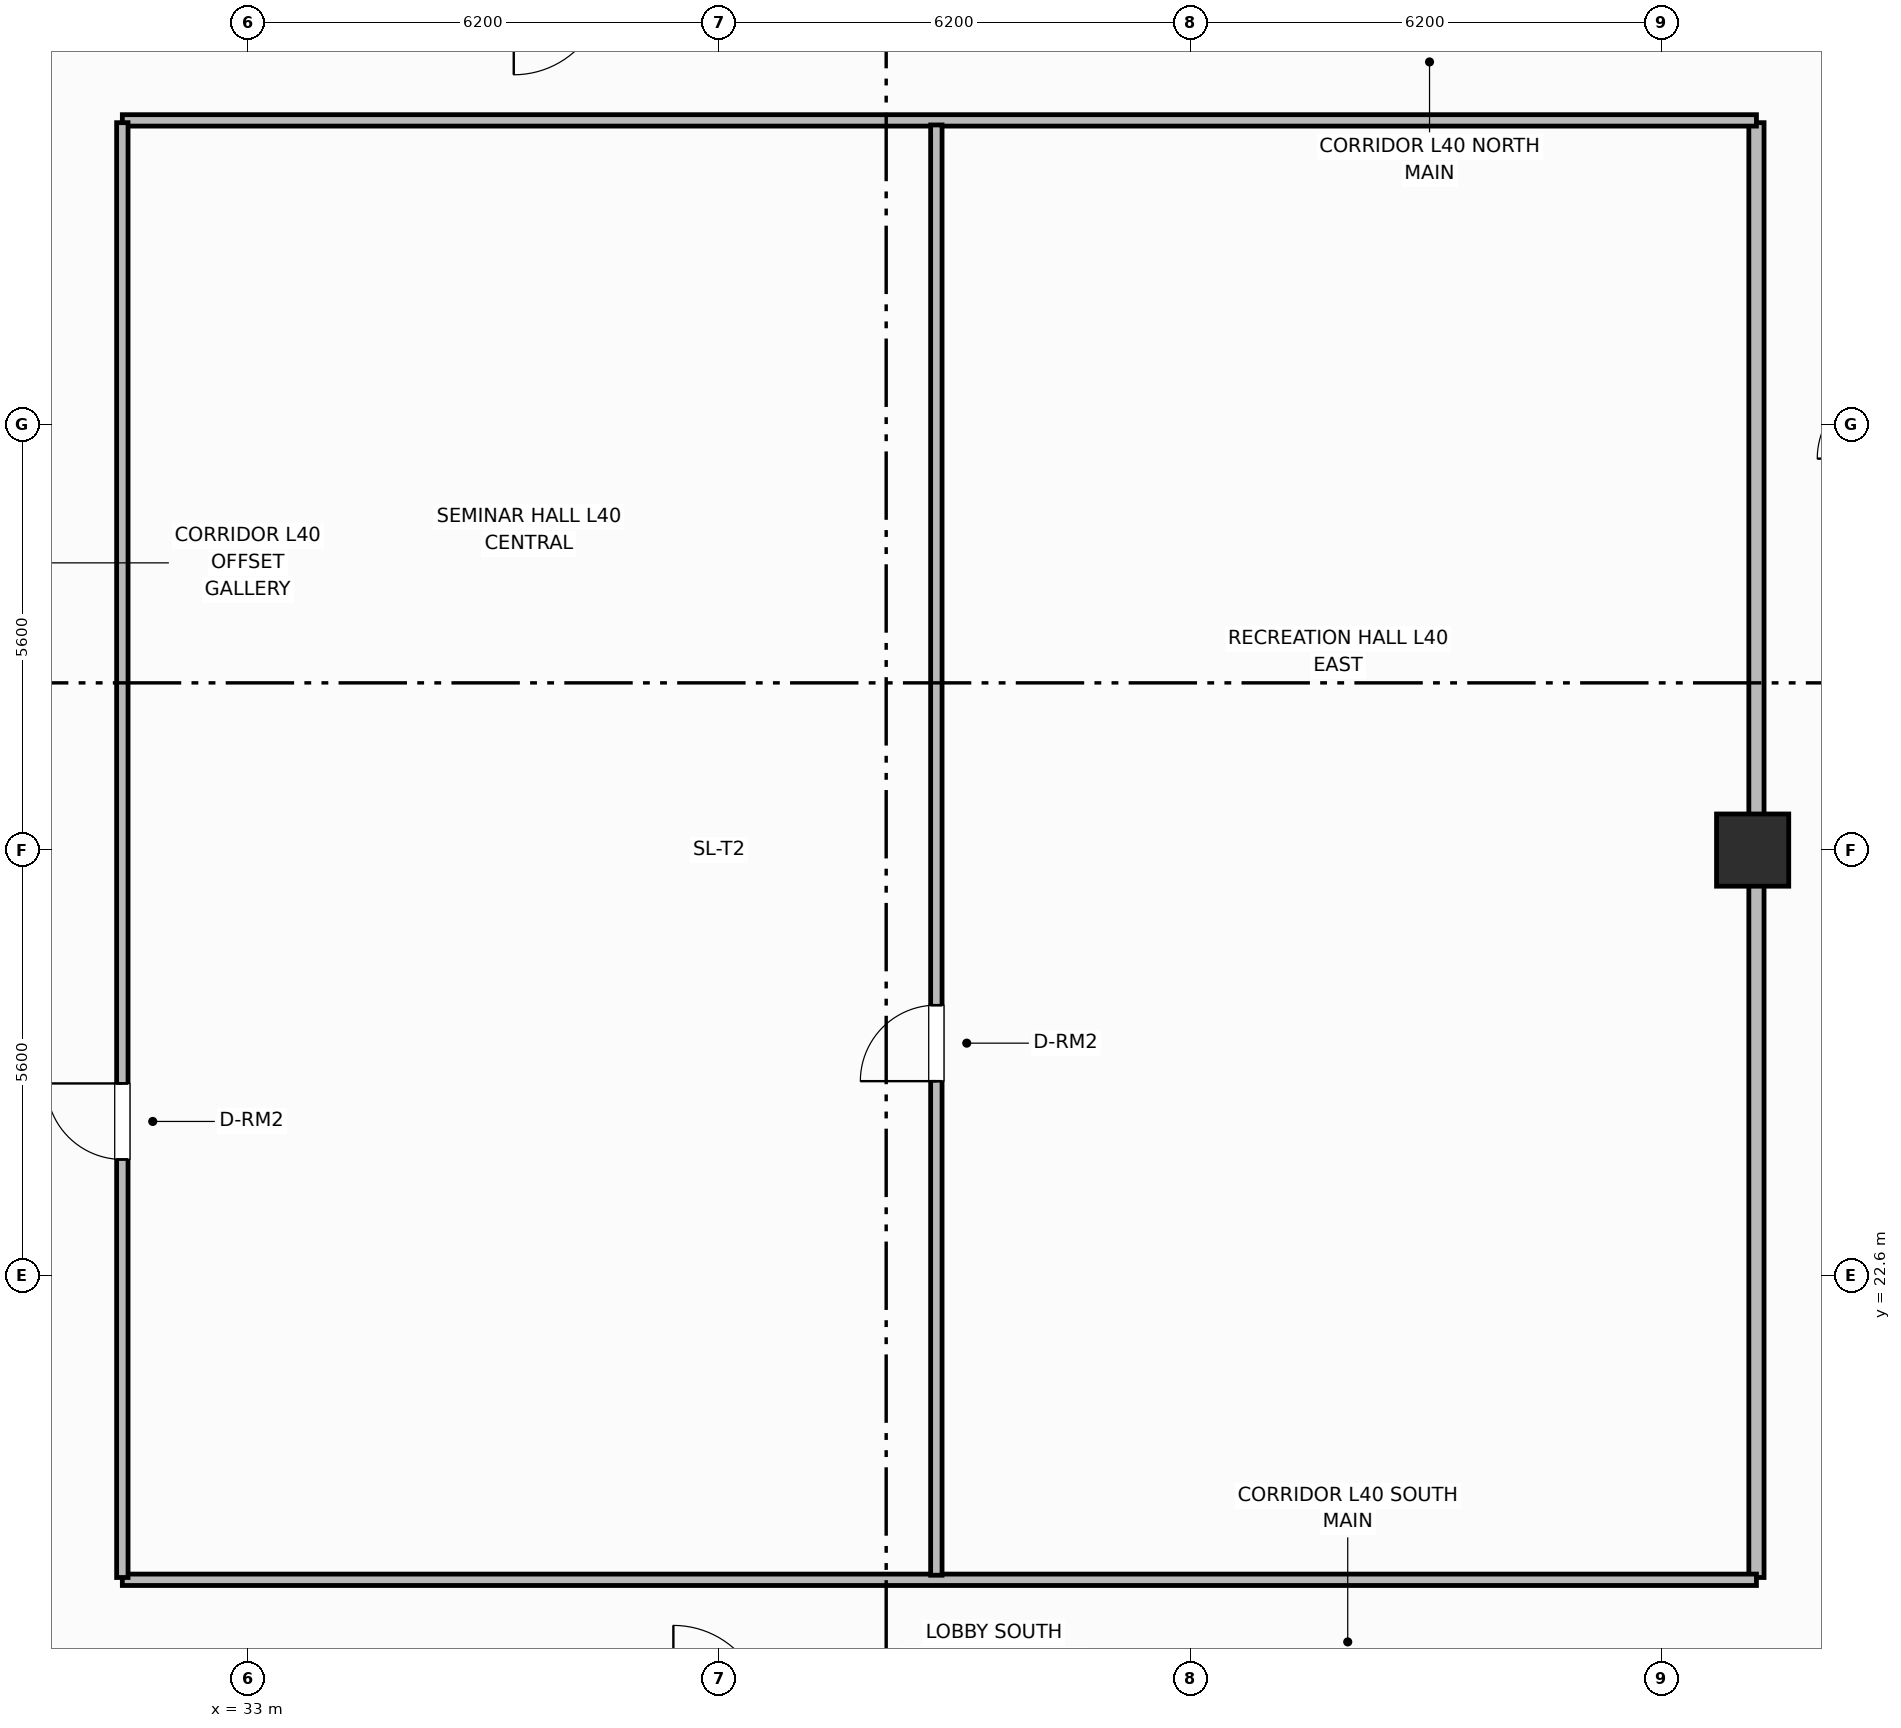
"""IFC4 building model, lengths in metres.
Left out: names, types, materials, properties, quantities, classifications, styles, units other than length and angle.
Written with IfcOpenShell. Run it as: python <this file> out.ifc"""

import sys

from ifc_helpers import new_model, si_unit, direction, frame, frame_2d, origin, origin_2d, place, context, subcontext, project, spatial, rectangle, extrude, element, fill, save


model = new_model("IFC4")
c1 = context("Model", 3, precision=1e-05, world=origin(), true_north=direction((0.0, 1.0)))
c2 = subcontext(c1, "Body", "Model", "MODEL_VIEW")
j1 = project(units=[si_unit("LENGTHUNIT", "METRE"), si_unit("PLANEANGLEUNIT", "RADIAN")], contexts=[c1])
p1 = place(None, origin())
s1 = spatial("IfcSite", under=j1, at=p1, CompositionType="ELEMENT")
p2 = place(p1, origin())
s2 = spatial("IfcBuilding", under=s1, at=p2, CompositionType="ELEMENT")
p3 = place(p2, frame((0.0, 0.0, 162.6)))
s3 = spatial("IfcBuildingStorey", under=s2, at=p3, CompositionType="ELEMENT", Elevation=162.6)
p4 = place(p3, frame((52.8, 28.2, 0.0), z_axis=(0.0, 0.0, 1.0), x_axis=(1.0, 0.0, 0.0)))
e1 = element("IfcColumn", 1, at=p4, inside=s3, PredefinedType="COLUMN", context=c2, shape_type="SweptSolid", body=[
    extrude(rectangle(XDim=0.95, YDim=0.95, at=origin_2d()), origin(), (0.0, 0.0, 1.0), 3.7),
])
p5 = place(p3, frame((52.85, 18.63, 0.0), z_axis=(0.0, 0.0, 1.0), x_axis=(0.0, 1.0, 0.0)))
e2 = element("IfcWall", 2, at=p5, inside=s3, PredefinedType="PARTITIONING", context=c2, shape_type="SweptSolid", body=[
    extrude(rectangle(XDim=19.14, YDim=0.2, at=frame_2d((9.57, 0.0))), origin(), (0.0, 0.0, 1.0), 2.55),
])
for number, where, z_axis, x_axis in (
    (3, (31.35, 18.6, 0.0), (0.0, 0.0, 1.0), (1.0, 0.0, 0.0)),
    (4, (31.35, 37.8, 0.0), (0.0, 0.0, 1.0), (1.0, 0.0, 0.0)),
):
    element("IfcWall", number, at=place(p3, frame(where, z_axis=z_axis, x_axis=x_axis)), inside=s3, PredefinedType="PARTITIONING", context=c2, shape_type="SweptSolid", body=[
        extrude(rectangle(XDim=21.5, YDim=0.15, at=frame_2d((10.75, 0.0))), origin(), (0.0, 0.0, 1.0), 2.55),
    ])
p6 = place(p3, frame((42.06, 18.66, 0.0), z_axis=(0.0, 0.0, 1.0), x_axis=(0.0, 1.0, 0.0)))
e5 = element("IfcWall", 5, at=p6, inside=s3, PredefinedType="PARTITIONING", context=c2, shape_type="SweptSolid", body=[
    extrude(rectangle(XDim=19.08, YDim=0.15, at=frame_2d((9.54, 0.0))), origin(), (0.0, 0.0, 1.0), 2.55),
])
p7 = place(p6, frame((6.5, 0.0, 0.0)))
e6 = element("IfcOpeningElement", 6, at=p7, cuts=e5, PredefinedType="OPENING", context=c2, shape_type="SweptSolid", body=[
    extrude(rectangle(XDim=1.0, YDim=2.15, at=frame_2d((0.5, 1.075))), frame((0.0, 0.085, 0.0), z_axis=(0.0, -1.0, 0.0), x_axis=(1.0, 0.0, 0.0)), (0.0, 0.0, 1.0), 0.17),
])
p8 = place(p3, frame((31.35, 18.63, 0.0), z_axis=(0.0, 0.0, 1.0), x_axis=(0.0, 1.0, 0.0)))
e7 = element("IfcWall", 7, at=p8, inside=s3, PredefinedType="PARTITIONING", context=c2, shape_type="SweptSolid", body=[
    extrude(rectangle(XDim=19.14, YDim=0.15, at=frame_2d((9.57, 0.0))), origin(), (0.0, 0.0, 1.0), 2.55),
])
p9 = place(p8, frame((5.5, 0.0, 0.0)))
e8 = element("IfcOpeningElement", 8, at=p9, cuts=e7, PredefinedType="OPENING", context=c2, shape_type="SweptSolid", body=[
    extrude(rectangle(XDim=1.0, YDim=2.15, at=frame_2d((0.5, 1.075))), frame((0.0, 0.085, 0.0), z_axis=(0.0, -1.0, 0.0), x_axis=(1.0, 0.0, 0.0)), (0.0, 0.0, 1.0), 0.17),
])
p10 = place(p7, origin())
e9 = element("IfcDoor", 9, at=p10, inside=s3, OperationType="SINGLE_SWING_LEFT", PredefinedType="DOOR", context=c2, shape_type="SweptSolid", body=[
    extrude(rectangle(XDim=1.0, YDim=2.15, at=frame_2d((0.5, 1.075))), frame((0.0, 0.025, 0.0), z_axis=(0.0, -1.0, 0.0), x_axis=(1.0, 0.0, 0.0)), (0.0, 0.0, 1.0), 0.05),
])
fill(e6, e9)
p11 = place(p9, origin())
e10 = element("IfcDoor", 10, at=p11, inside=s3, OperationType="SINGLE_SWING_RIGHT", PredefinedType="DOOR", context=c2, shape_type="SweptSolid", body=[
    extrude(rectangle(XDim=1.0, YDim=2.15, at=frame_2d((0.5, 1.075))), frame((0.0, 0.025, 0.0), z_axis=(0.0, -1.0, 0.0), x_axis=(1.0, 0.0, 0.0)), (0.0, 0.0, 1.0), 0.05),
])
fill(e8, e10)
save(model, sys.argv[1])
